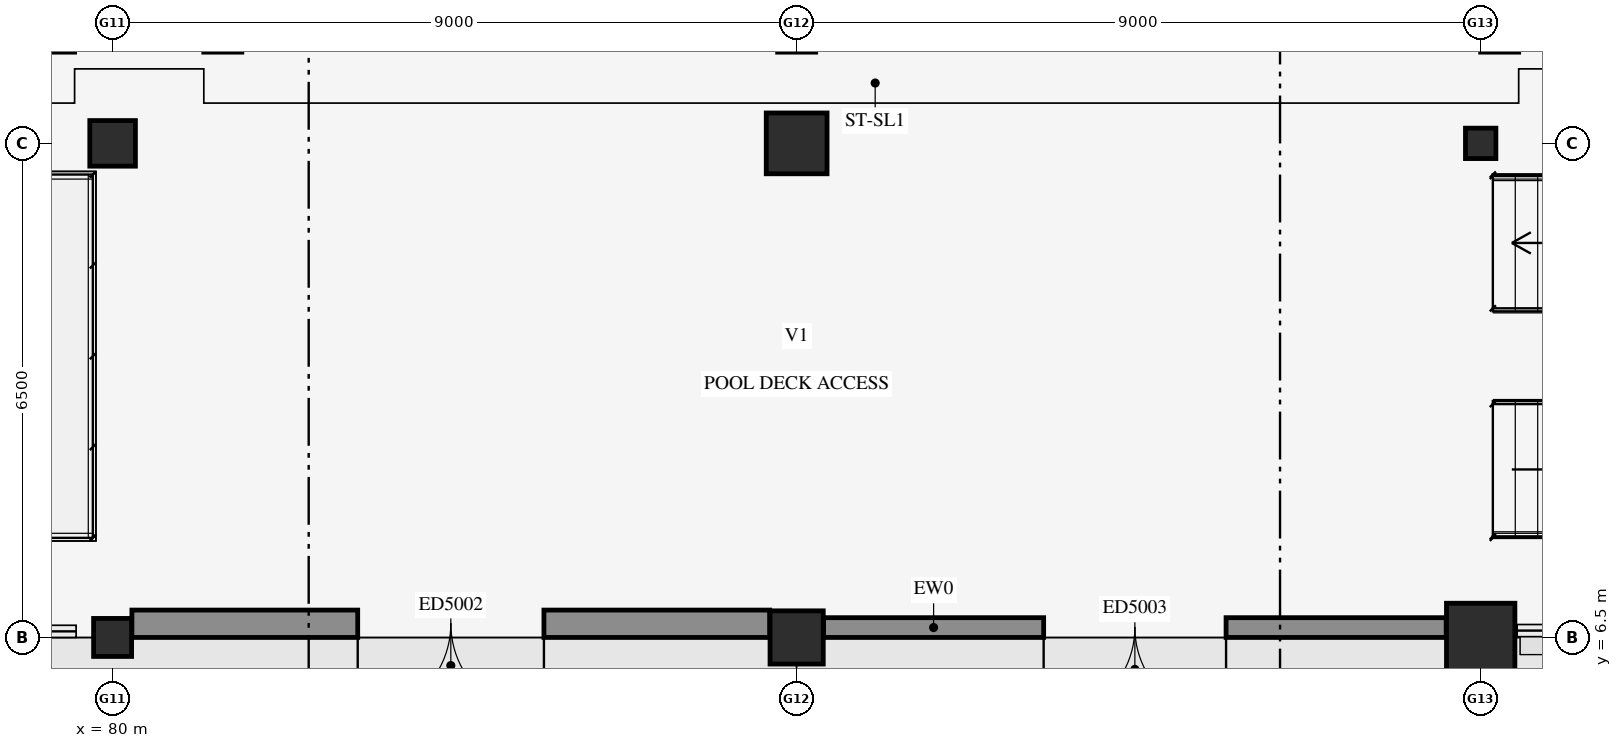
"""IFC4 building model, lengths in metres.
Left out: names, types, materials, properties, quantities, classifications, styles, units other than length and angle.
Written with IfcOpenShell. Run it as: python <this file> out.ifc"""

import sys

from ifc_helpers import new_model, si_unit, direction, frame, frame_2d, origin, origin_2d, place, context, subcontext, project, spatial, rectangle, circle, extrude, element, fill, save


model = new_model("IFC4")
c1 = context("Model", 3, precision=1e-05, world=origin(), true_north=direction((0.0, 1.0)))
c2 = subcontext(c1, "Body", "Model", "MODEL_VIEW")
j1 = project(units=[si_unit("LENGTHUNIT", "METRE"), si_unit("PLANEANGLEUNIT", "RADIAN")], contexts=[c1])
p1 = place(None, origin())
s1 = spatial("IfcSite", under=j1, at=p1, CompositionType="ELEMENT")
p2 = place(p1, origin())
s2 = spatial("IfcBuilding", under=s1, at=p2, CompositionType="ELEMENT")
p3 = place(p2, origin())
s3 = spatial("IfcBuildingStorey", under=s2, at=p3, CompositionType="ELEMENT", Elevation=0.0)
p4 = place(p3, frame((80.0, 6.5, 0.0), z_axis=(0.0, 0.0, 1.0), x_axis=(1.0, 0.0, 0.0)))
e1 = element("IfcColumn", 1, at=p4, inside=s3, PredefinedType="COLUMN", context=c2, shape_type="SweptSolid", body=[
    extrude(circle(Radius=0.25, at=origin_2d()), origin(), (0.0, 0.0, 1.0), 5.4),
])
p5 = place(p3, frame((80.0, 13.0, 0.0), z_axis=(0.0, 0.0, 1.0), x_axis=(1.0, 0.0, 0.0)))
e2 = element("IfcColumn", 2, at=p5, inside=s3, PredefinedType="COLUMN", context=c2, shape_type="SweptSolid", body=[
    extrude(circle(Radius=0.3, at=origin_2d()), origin(), (0.0, 0.0, 1.0), 5.4),
])
p6 = place(p3, frame((89.0, 6.5, 0.0), z_axis=(0.0, 0.0, 1.0), x_axis=(1.0, 0.0, 0.0)))
e3 = element("IfcColumn", 3, at=p6, inside=s3, PredefinedType="COLUMN", context=c2, shape_type="SweptSolid", body=[
    extrude(circle(Radius=0.35, at=origin_2d()), origin(), (0.0, 0.0, 1.0), 5.4),
])
p7 = place(p3, frame((89.0, 13.0, 0.0), z_axis=(0.0, 0.0, 1.0), x_axis=(1.0, 0.0, 0.0)))
e4 = element("IfcColumn", 4, at=p7, inside=s3, PredefinedType="COLUMN", context=c2, shape_type="SweptSolid", body=[
    extrude(circle(Radius=0.4, at=origin_2d()), origin(), (0.0, 0.0, 1.0), 5.4),
])
p8 = place(p3, frame((98.0, 6.5, 0.0), z_axis=(0.0, 0.0, 1.0), x_axis=(1.0, 0.0, 0.0)))
e5 = element("IfcColumn", 5, at=p8, inside=s3, PredefinedType="COLUMN", context=c2, shape_type="SweptSolid", body=[
    extrude(circle(Radius=0.45, at=origin_2d()), origin(), (0.0, 0.0, 1.0), 5.4),
])
p9 = place(p3, frame((98.0, 13.0, 0.0), z_axis=(0.0, 0.0, 1.0), x_axis=(1.0, 0.0, 0.0)))
e6 = element("IfcColumn", 6, at=p9, inside=s3, PredefinedType="COLUMN", context=c2, shape_type="SweptSolid", body=[
    extrude(rectangle(XDim=0.4, YDim=0.4, at=origin_2d()), origin(), (0.0, 0.0, 1.0), 5.4),
])
p10 = place(p3, frame((80.254, 6.68, 0.0), z_axis=(0.0, 0.0, 1.0), x_axis=(1.0, 0.0, 0.0)))
e7 = element("IfcWall", 7, at=p10, inside=s3, PredefinedType="SOLIDWALL", context=c2, shape_type="SweptSolid", body=[
    extrude(rectangle(XDim=8.392, YDim=0.36, at=frame_2d((4.196, 0.0))), origin(), (0.0, 0.0, 1.0), 4.664),
])
p11 = place(p10, frame((2.971, 0.0, 0.0)))
e8 = element("IfcOpeningElement", 8, at=p11, cuts=e7, PredefinedType="OPENING", context=c2, shape_type="SweptSolid", body=[
    extrude(rectangle(XDim=2.45, YDim=2.95, at=frame_2d((1.225, 1.475))), frame((0.0, 0.192, 0.0), z_axis=(0.0, -1.0, 0.0), x_axis=(1.0, 0.0, 0.0)), (0.0, 0.0, 1.0), 0.384),
])
p12 = place(p3, frame((89.354, 6.63, 0.0), z_axis=(0.0, 0.0, 1.0), x_axis=(1.0, 0.0, 0.0)))
e9 = element("IfcWall", 9, at=p12, inside=s3, PredefinedType="SOLIDWALL", context=c2, shape_type="SweptSolid", body=[
    extrude(rectangle(XDim=8.192, YDim=0.26, at=frame_2d((4.096, 0.0))), origin(), (0.0, 0.0, 1.0), 4.537),
])
p13 = place(p12, frame((2.896, 0.0, 0.0)))
e10 = element("IfcOpeningElement", 10, at=p13, cuts=e9, PredefinedType="OPENING", context=c2, shape_type="SweptSolid", body=[
    extrude(rectangle(XDim=2.4, YDim=2.6, at=frame_2d((1.2, 1.3))), frame((0.0, 0.142, 0.0), z_axis=(0.0, -1.0, 0.0), x_axis=(1.0, 0.0, 0.0)), (0.0, 0.0, 1.0), 0.284),
])
p14 = place(p11, frame((2.45, 0.0, 0.0), z_axis=(0.0, 0.0, 1.0), x_axis=(-1.0, 0.0, 0.0)))
e11 = element("IfcDoor", 11, at=p14, inside=s3, OperationType="DOUBLE_DOOR_SINGLE_SWING", PredefinedType="DOOR", context=c2, shape_type="SweptSolid", body=[
    extrude(rectangle(XDim=2.45, YDim=2.95, at=frame_2d((1.225, 1.475))), frame((0.0, 0.025, 0.0), z_axis=(0.0, -1.0, 0.0), x_axis=(1.0, 0.0, 0.0)), (0.0, 0.0, 1.0), 0.05),
])
fill(e8, e11)
p15 = place(p13, frame((2.4, 0.0, 0.0), z_axis=(0.0, 0.0, 1.0), x_axis=(-1.0, 0.0, 0.0)))
e12 = element("IfcDoor", 12, at=p15, inside=s3, OperationType="DOUBLE_DOOR_SINGLE_SWING", PredefinedType="DOOR", context=c2, shape_type="SweptSolid", body=[
    extrude(rectangle(XDim=2.4, YDim=2.6, at=frame_2d((1.2, 1.3))), frame((0.0, 0.025, 0.0), z_axis=(0.0, -1.0, 0.0), x_axis=(1.0, 0.0, 0.0)), (0.0, 0.0, 1.0), 0.05),
])
fill(e10, e12)
save(model, sys.argv[1])
